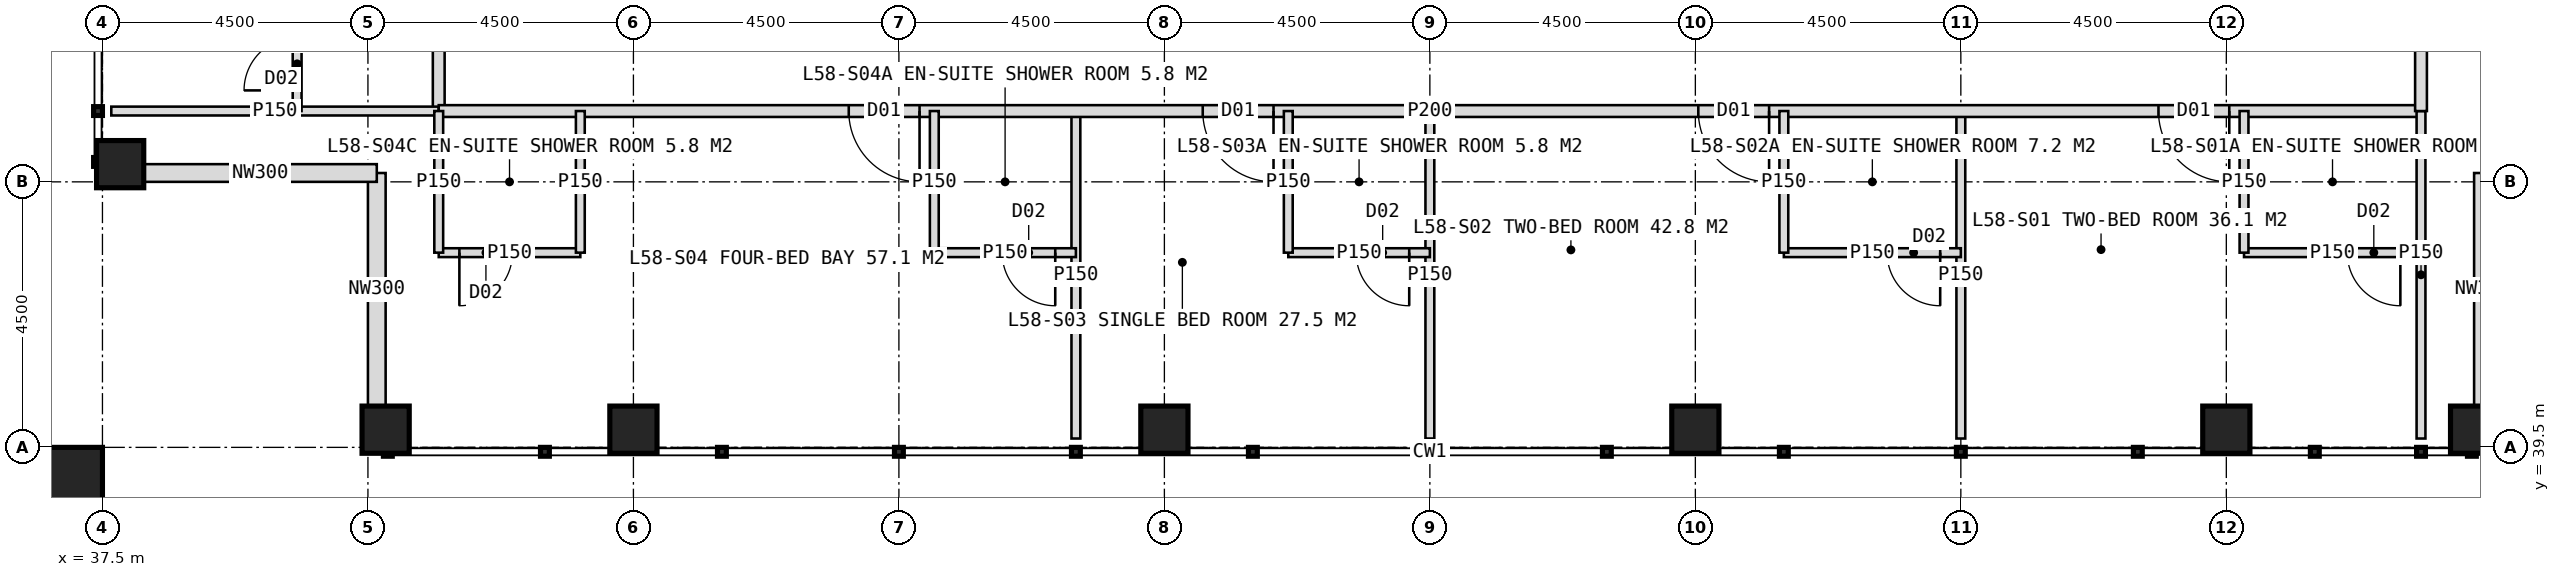
"""IFC4 building model, lengths in metres.
Left out: names, types, materials, properties, quantities, classifications, styles, units other than length and angle.
Written with IfcOpenShell. Run it as: python <this file> out.ifc"""

import sys

from ifc_helpers import new_model, si_unit, direction, frame, frame_2d, origin, origin_2d, place, context, subcontext, project, spatial, rectangle, hollow_rectangle, extrude, element, fill, save


model = new_model("IFC4")
c1 = context("Model", 3, precision=1e-05, world=origin(), true_north=direction((0.0, 1.0)))
c2 = subcontext(c1, "Body", "Model", "MODEL_VIEW")
j1 = project(units=[si_unit("LENGTHUNIT", "METRE"), si_unit("PLANEANGLEUNIT", "RADIAN")], contexts=[c1])
p1 = place(None, origin())
s1 = spatial("IfcSite", under=j1, at=p1, CompositionType="ELEMENT")
p2 = place(p1, origin())
s2 = spatial("IfcBuilding", under=s1, at=p2, CompositionType="ELEMENT")
p3 = place(p2, frame((0.0, 0.0, 241.0)))
s3 = spatial("IfcBuildingStorey", under=s2, at=p3, CompositionType="ELEMENT", Elevation=241.0)
for number, where, z_axis, x_axis in (
    (1, (42.3, 39.8, 0.0), (0.0, 0.0, 1.0), (1.0, 0.0, 0.0)),
    (2, (37.8, 44.3, 0.0), (0.0, 0.0, 1.0), (1.0, 0.0, 0.0)),
    (3, (46.5, 39.8, 0.0), (0.0, 0.0, 1.0), (1.0, 0.0, 0.0)),
    (4, (55.5, 39.8, 0.0), (0.0, 0.0, 1.0), (1.0, 0.0, 0.0)),
    (5, (64.5, 39.8, 0.0), (0.0, 0.0, 1.0), (1.0, 0.0, 0.0)),
    (6, (73.5, 39.8, 0.0), (0.0, 0.0, 1.0), (1.0, 0.0, 0.0)),
    (7, (77.7, 39.8, 0.0), (0.0, 0.0, 1.0), (1.0, 0.0, 0.0)),
):
    element("IfcColumn", number, at=place(p3, frame(where, z_axis=z_axis, x_axis=x_axis)), inside=s3, PredefinedType="COLUMN", context=c2, shape_type="SweptSolid", body=[
        extrude(hollow_rectangle(XDim=0.8, YDim=0.8, WallThickness=0.08, at=origin_2d()), origin(), (0.0, 0.0, 1.0), 4.0),
    ])
p4 = place(p3, frame((36.9, 38.9, 0.0), z_axis=(0.0, 0.0, 1.0), x_axis=(1.0, 0.0, 0.0)))
e8 = element("IfcColumn", 8, at=p4, inside=s3, PredefinedType="COLUMN", context=c2, shape_type="SweptSolid", body=[
    extrude(hollow_rectangle(XDim=1.2, YDim=1.2, WallThickness=0.07, at=origin_2d()), origin(), (0.0, 0.0, 1.0), 2.0),
])
for number, where, z_axis, x_axis in (
    (9, (42.15, 40.2, 0.0), (0.0, 0.0, 1.0), (0.0, 1.0, 0.0)),
    (10, (42.15, 44.15, 0.0), (0.0, 0.0, 1.0), (-1.0, 0.0, 0.0)),
    (11, (77.85, 44.15, 0.0), (0.0, 0.0, 1.0), (0.0, -1.0, 0.0)),
):
    element("IfcWall", number, at=place(p3, frame(where, z_axis=z_axis, x_axis=x_axis)), inside=s3, PredefinedType="ELEMENTEDWALL", context=c2, shape_type="SweptSolid", body=[
        extrude(rectangle(XDim=3.95, YDim=0.3, at=frame_2d((1.975, 0.0))), origin(), (0.0, 0.0, 1.0), 2.95),
    ])
p5 = place(p3, frame((43.2, 45.2, 0.0), z_axis=(0.0, 0.0, 1.0), x_axis=(0.0, 1.0, 0.0)))
e12 = element("IfcWall", 12, at=p5, inside=s3, PredefinedType="PARTITIONING", context=c2, shape_type="SweptSolid", body=[
    extrude(rectangle(XDim=33.6, YDim=0.2, at=frame_2d((16.8, 0.0))), origin(), (0.0, 0.0, 1.0), 3.75),
])
p6 = place(p5, frame((2.65, 0.0, 0.0)))
e13 = element("IfcOpeningElement", 13, at=p6, cuts=e12, PredefinedType="OPENING", context=c2, shape_type="SweptSolid", body=[
    extrude(rectangle(XDim=1.2, YDim=2.2, at=frame_2d((0.6, 1.1))), frame((0.0, 0.11, 0.0), z_axis=(0.0, -1.0, 0.0), x_axis=(1.0, 0.0, 0.0)), (0.0, 0.0, 1.0), 0.22),
])
p7 = place(p5, frame((7.45, 0.0, 0.0)))
e14 = element("IfcOpeningElement", 14, at=p7, cuts=e12, PredefinedType="OPENING", context=c2, shape_type="SweptSolid", body=[
    extrude(rectangle(XDim=1.2, YDim=2.2, at=frame_2d((0.6, 1.1))), frame((0.0, 0.11, 0.0), z_axis=(0.0, -1.0, 0.0), x_axis=(1.0, 0.0, 0.0)), (0.0, 0.0, 1.0), 0.22),
])
p8 = place(p5, frame((13.45, 0.0, 0.0)))
e15 = element("IfcOpeningElement", 15, at=p8, cuts=e12, PredefinedType="OPENING", context=c2, shape_type="SweptSolid", body=[
    extrude(rectangle(XDim=1.2, YDim=2.2, at=frame_2d((0.6, 1.1))), frame((0.0, 0.11, 0.0), z_axis=(0.0, -1.0, 0.0), x_axis=(1.0, 0.0, 0.0)), (0.0, 0.0, 1.0), 0.22),
])
p9 = place(p5, frame((20.05, 0.0, 0.0)))
e16 = element("IfcOpeningElement", 16, at=p9, cuts=e12, PredefinedType="OPENING", context=c2, shape_type="SweptSolid", body=[
    extrude(rectangle(XDim=1.2, YDim=2.2, at=frame_2d((0.6, 1.1))), frame((0.0, 0.11, 0.0), z_axis=(0.0, -1.0, 0.0), x_axis=(1.0, 0.0, 0.0)), (0.0, 0.0, 1.0), 0.22),
])
p10 = place(p5, frame((29.05, 0.0, 0.0)))
e17 = element("IfcOpeningElement", 17, at=p10, cuts=e12, PredefinedType="OPENING", context=c2, shape_type="SweptSolid", body=[
    extrude(rectangle(XDim=1.2, YDim=2.2, at=frame_2d((0.6, 1.1))), frame((0.0, 0.11, 0.0), z_axis=(0.0, -1.0, 0.0), x_axis=(1.0, 0.0, 0.0)), (0.0, 0.0, 1.0), 0.22),
])
p11 = place(p3, frame((43.2, 45.2, 0.0), z_axis=(0.0, 0.0, 1.0), x_axis=(-1.0, 0.0, 0.0)))
e18 = element("IfcWall", 18, at=p11, inside=s3, PredefinedType="PARTITIONING", context=c2, shape_type="SweptSolid", body=[
    extrude(rectangle(XDim=5.55, YDim=0.15, at=frame_2d((2.775, 0.0))), origin(), (0.0, 0.0, 1.0), 3.75),
])
p12 = place(p3, frame((40.8, 45.2, 0.0), z_axis=(0.0, 0.0, 1.0), x_axis=(0.0, 1.0, 0.0)))
e19 = element("IfcWall", 19, at=p12, inside=s3, PredefinedType="PARTITIONING", context=c2, shape_type="SweptSolid", body=[
    extrude(rectangle(XDim=2.4, YDim=0.15, at=frame_2d((1.2, 0.0))), origin(), (0.0, 0.0, 1.0), 3.75),
])
p13 = place(p12, frame((0.35, 0.0, 0.0)))
e20 = element("IfcOpeningElement", 20, at=p13, cuts=e19, PredefinedType="OPENING", context=c2, shape_type="SweptSolid", body=[
    extrude(rectangle(XDim=0.9, YDim=2.1, at=frame_2d((0.45, 1.05))), frame((0.0, 0.085, 0.0), z_axis=(0.0, -1.0, 0.0), x_axis=(1.0, 0.0, 0.0)), (0.0, 0.0, 1.0), 0.17),
])
p14 = place(p3, frame((69.0, 45.2, 0.0), z_axis=(0.0, 0.0, 1.0), x_axis=(0.0, -1.0, 0.0)))
e21 = element("IfcWall", 21, at=p14, inside=s3, PredefinedType="PARTITIONING", context=c2, shape_type="SweptSolid", body=[
    extrude(rectangle(XDim=5.55, YDim=0.15, at=frame_2d((2.775, 0.0))), origin(), (0.0, 0.0, 1.0), 3.75),
])
p15 = place(p3, frame((60.0, 45.2, 0.0), z_axis=(0.0, 0.0, 1.0), x_axis=(0.0, -1.0, 0.0)))
e22 = element("IfcWall", 22, at=p15, inside=s3, PredefinedType="PARTITIONING", context=c2, shape_type="SweptSolid", body=[
    extrude(rectangle(XDim=5.55, YDim=0.15, at=frame_2d((2.775, 0.0))), origin(), (0.0, 0.0, 1.0), 2.95),
])
p16 = place(p3, frame((54.0, 45.2, 0.0), z_axis=(0.0, 0.0, 1.0), x_axis=(0.0, -1.0, 0.0)))
e23 = element("IfcWall", 23, at=p16, inside=s3, PredefinedType="PARTITIONING", context=c2, shape_type="SweptSolid", body=[
    extrude(rectangle(XDim=5.55, YDim=0.15, at=frame_2d((2.775, 0.0))), origin(), (0.0, 0.0, 1.0), 3.75),
])
p17 = place(p3, frame((76.8, 45.2, 0.0), z_axis=(0.0, 0.0, 1.0), x_axis=(-1.0, 0.0, 0.0)))
e24 = element("IfcWall", 24, at=p17, inside=s3, PredefinedType="PARTITIONING", context=c2, shape_type="SweptSolid", body=[
    extrude(rectangle(XDim=33.6, YDim=0.2, at=frame_2d((16.8, 0.0))), origin(), (0.0, 0.0, 1.0), 3.75),
])
p18 = place(p17, frame((3.25, 0.0, 0.0)))
e25 = element("IfcOpeningElement", 25, at=p18, cuts=e24, PredefinedType="OPENING", context=c2, shape_type="SweptSolid", body=[
    extrude(rectangle(XDim=1.2, YDim=2.2, at=frame_2d((0.6, 1.1))), frame((0.0, 0.11, 0.0), z_axis=(0.0, -1.0, 0.0), x_axis=(1.0, 0.0, 0.0)), (0.0, 0.0, 1.0), 0.22),
])
p19 = place(p17, frame((11.05, 0.0, 0.0)))
e26 = element("IfcOpeningElement", 26, at=p19, cuts=e24, PredefinedType="OPENING", context=c2, shape_type="SweptSolid", body=[
    extrude(rectangle(XDim=1.2, YDim=2.2, at=frame_2d((0.6, 1.1))), frame((0.0, 0.11, 0.0), z_axis=(0.0, -1.0, 0.0), x_axis=(1.0, 0.0, 0.0)), (0.0, 0.0, 1.0), 0.22),
])
p20 = place(p17, frame((19.45, 0.0, 0.0)))
e27 = element("IfcOpeningElement", 27, at=p20, cuts=e24, PredefinedType="OPENING", context=c2, shape_type="SweptSolid", body=[
    extrude(rectangle(XDim=1.2, YDim=2.2, at=frame_2d((0.6, 1.1))), frame((0.0, 0.11, 0.0), z_axis=(0.0, -1.0, 0.0), x_axis=(1.0, 0.0, 0.0)), (0.0, 0.0, 1.0), 0.22),
])
p21 = place(p17, frame((25.45, 0.0, 0.0)))
e28 = element("IfcOpeningElement", 28, at=p21, cuts=e24, PredefinedType="OPENING", context=c2, shape_type="SweptSolid", body=[
    extrude(rectangle(XDim=1.2, YDim=2.2, at=frame_2d((0.6, 1.1))), frame((0.0, 0.11, 0.0), z_axis=(0.0, -1.0, 0.0), x_axis=(1.0, 0.0, 0.0)), (0.0, 0.0, 1.0), 0.22),
])
p22 = place(p3, frame((76.8, 45.2, 0.0), z_axis=(0.0, 0.0, 1.0), x_axis=(0.0, -1.0, 0.0)))
e29 = element("IfcWall", 29, at=p22, inside=s3, PredefinedType="PARTITIONING", context=c2, shape_type="SweptSolid", body=[
    extrude(rectangle(XDim=5.55, YDim=0.15, at=frame_2d((2.775, 0.0))), origin(), (0.0, 0.0, 1.0), 3.75),
])
p23 = place(p3, frame((76.8, 42.8, 0.0), z_axis=(0.0, 0.0, 1.0), x_axis=(-1.0, 0.0, 0.0)))
e30 = element("IfcWall", 30, at=p23, inside=s3, PredefinedType="PARTITIONING", context=c2, shape_type="SweptSolid", body=[
    extrude(rectangle(XDim=3.0, YDim=0.15, at=frame_2d((1.5, 0.0))), origin(), (0.0, 0.0, 1.0), 3.75),
])
p24 = place(p23, frame((0.35, 0.0, 0.0)))
e31 = element("IfcOpeningElement", 31, at=p24, cuts=e30, PredefinedType="OPENING", context=c2, shape_type="SweptSolid", body=[
    extrude(rectangle(XDim=0.9, YDim=2.1, at=frame_2d((0.45, 1.05))), frame((0.0, 0.085, 0.0), z_axis=(0.0, -1.0, 0.0), x_axis=(1.0, 0.0, 0.0)), (0.0, 0.0, 1.0), 0.17),
])
p25 = place(p3, frame((73.8, 45.2, 0.0), z_axis=(0.0, 0.0, 1.0), x_axis=(0.0, -1.0, 0.0)))
e32 = element("IfcWall", 32, at=p25, inside=s3, PredefinedType="PARTITIONING", context=c2, shape_type="SweptSolid", body=[
    extrude(rectangle(XDim=2.4, YDim=0.15, at=frame_2d((1.2, 0.0))), origin(), (0.0, 0.0, 1.0), 3.75),
])
p26 = place(p3, frame((69.0, 42.8, 0.0), z_axis=(0.0, 0.0, 1.0), x_axis=(-1.0, 0.0, 0.0)))
e33 = element("IfcWall", 33, at=p26, inside=s3, PredefinedType="PARTITIONING", context=c2, shape_type="SweptSolid", body=[
    extrude(rectangle(XDim=3.0, YDim=0.15, at=frame_2d((1.5, 0.0))), origin(), (0.0, 0.0, 1.0), 3.75),
])
p27 = place(p26, frame((0.35, 0.0, 0.0)))
e34 = element("IfcOpeningElement", 34, at=p27, cuts=e33, PredefinedType="OPENING", context=c2, shape_type="SweptSolid", body=[
    extrude(rectangle(XDim=0.9, YDim=2.1, at=frame_2d((0.45, 1.05))), frame((0.0, 0.085, 0.0), z_axis=(0.0, -1.0, 0.0), x_axis=(1.0, 0.0, 0.0)), (0.0, 0.0, 1.0), 0.17),
])
p28 = place(p3, frame((66.0, 45.2, 0.0), z_axis=(0.0, 0.0, 1.0), x_axis=(0.0, -1.0, 0.0)))
e35 = element("IfcWall", 35, at=p28, inside=s3, PredefinedType="PARTITIONING", context=c2, shape_type="SweptSolid", body=[
    extrude(rectangle(XDim=2.4, YDim=0.15, at=frame_2d((1.2, 0.0))), origin(), (0.0, 0.0, 1.0), 3.75),
])
p29 = place(p3, frame((60.0, 42.8, 0.0), z_axis=(0.0, 0.0, 1.0), x_axis=(-1.0, 0.0, 0.0)))
e36 = element("IfcWall", 36, at=p29, inside=s3, PredefinedType="PARTITIONING", context=c2, shape_type="SweptSolid", body=[
    extrude(rectangle(XDim=2.4, YDim=0.15, at=frame_2d((1.2, 0.0))), origin(), (0.0, 0.0, 1.0), 3.75),
])
p30 = place(p29, frame((0.35, 0.0, 0.0)))
e37 = element("IfcOpeningElement", 37, at=p30, cuts=e36, PredefinedType="OPENING", context=c2, shape_type="SweptSolid", body=[
    extrude(rectangle(XDim=0.9, YDim=2.1, at=frame_2d((0.45, 1.05))), frame((0.0, 0.085, 0.0), z_axis=(0.0, -1.0, 0.0), x_axis=(1.0, 0.0, 0.0)), (0.0, 0.0, 1.0), 0.17),
])
p31 = place(p3, frame((57.6, 45.2, 0.0), z_axis=(0.0, 0.0, 1.0), x_axis=(0.0, -1.0, 0.0)))
e38 = element("IfcWall", 38, at=p31, inside=s3, PredefinedType="PARTITIONING", context=c2, shape_type="SweptSolid", body=[
    extrude(rectangle(XDim=2.4, YDim=0.15, at=frame_2d((1.2, 0.0))), origin(), (0.0, 0.0, 1.0), 3.75),
])
p32 = place(p3, frame((54.0, 42.8, 0.0), z_axis=(0.0, 0.0, 1.0), x_axis=(-1.0, 0.0, 0.0)))
e39 = element("IfcWall", 39, at=p32, inside=s3, PredefinedType="PARTITIONING", context=c2, shape_type="SweptSolid", body=[
    extrude(rectangle(XDim=2.4, YDim=0.15, at=frame_2d((1.2, 0.0))), origin(), (0.0, 0.0, 1.0), 3.75),
])
p33 = place(p32, frame((0.35, 0.0, 0.0)))
e40 = element("IfcOpeningElement", 40, at=p33, cuts=e39, PredefinedType="OPENING", context=c2, shape_type="SweptSolid", body=[
    extrude(rectangle(XDim=0.9, YDim=2.1, at=frame_2d((0.45, 1.05))), frame((0.0, 0.085, 0.0), z_axis=(0.0, -1.0, 0.0), x_axis=(1.0, 0.0, 0.0)), (0.0, 0.0, 1.0), 0.17),
])
p34 = place(p3, frame((51.6, 45.2, 0.0), z_axis=(0.0, 0.0, 1.0), x_axis=(0.0, -1.0, 0.0)))
e41 = element("IfcWall", 41, at=p34, inside=s3, PredefinedType="PARTITIONING", context=c2, shape_type="SweptSolid", body=[
    extrude(rectangle(XDim=2.4, YDim=0.15, at=frame_2d((1.2, 0.0))), origin(), (0.0, 0.0, 1.0), 3.75),
])
p35 = place(p3, frame((45.6, 42.8, 0.0), z_axis=(0.0, 0.0, 1.0), x_axis=(-1.0, 0.0, 0.0)))
e42 = element("IfcWall", 42, at=p35, inside=s3, PredefinedType="PARTITIONING", context=c2, shape_type="SweptSolid", body=[
    extrude(rectangle(XDim=2.4, YDim=0.15, at=frame_2d((1.2, 0.0))), origin(), (0.0, 0.0, 1.0), 3.75),
])
p36 = place(p35, frame((1.15, 0.0, 0.0)))
e43 = element("IfcOpeningElement", 43, at=p36, cuts=e42, PredefinedType="OPENING", context=c2, shape_type="SweptSolid", body=[
    extrude(rectangle(XDim=0.9, YDim=2.1, at=frame_2d((0.45, 1.05))), frame((0.0, 0.085, 0.0), z_axis=(0.0, -1.0, 0.0), x_axis=(1.0, 0.0, 0.0)), (0.0, 0.0, 1.0), 0.17),
])
for number, where, z_axis, x_axis in (
    (44, (45.6, 45.2, 0.0), (0.0, 0.0, 1.0), (0.0, -1.0, 0.0)),
    (45, (43.2, 45.2, 0.0), (0.0, 0.0, 1.0), (0.0, -1.0, 0.0)),
):
    element("IfcWall", number, at=place(p3, frame(where, z_axis=z_axis, x_axis=x_axis)), inside=s3, PredefinedType="PARTITIONING", context=c2, shape_type="SweptSolid", body=[
        extrude(rectangle(XDim=2.4, YDim=0.15, at=frame_2d((1.2, 0.0))), origin(), (0.0, 0.0, 1.0), 3.75),
    ])
p37 = place(p3, frame((76.8, 78.8, 0.0), z_axis=(0.0, 0.0, 1.0), x_axis=(0.0, -1.0, 0.0)))
e46 = element("IfcWall", 46, at=p37, inside=s3, PredefinedType="PARTITIONING", context=c2, shape_type="SweptSolid", body=[
    extrude(rectangle(XDim=33.6, YDim=0.2, at=frame_2d((16.8, 0.0))), origin(), (0.0, 0.0, 1.0), 3.75),
])
p38 = place(p37, frame((2.65, 0.0, 0.0)))
e47 = element("IfcOpeningElement", 47, at=p38, cuts=e46, PredefinedType="OPENING", context=c2, shape_type="SweptSolid", body=[
    extrude(rectangle(XDim=1.2, YDim=2.2, at=frame_2d((0.6, 1.1))), frame((0.0, 0.11, 0.0), z_axis=(0.0, -1.0, 0.0), x_axis=(1.0, 0.0, 0.0)), (0.0, 0.0, 1.0), 0.22),
])
p39 = place(p37, frame((7.45, 0.0, 0.0)))
e48 = element("IfcOpeningElement", 48, at=p39, cuts=e46, PredefinedType="OPENING", context=c2, shape_type="SweptSolid", body=[
    extrude(rectangle(XDim=1.2, YDim=2.2, at=frame_2d((0.6, 1.1))), frame((0.0, 0.11, 0.0), z_axis=(0.0, -1.0, 0.0), x_axis=(1.0, 0.0, 0.0)), (0.0, 0.0, 1.0), 0.22),
])
p40 = place(p37, frame((13.45, 0.0, 0.0)))
e49 = element("IfcOpeningElement", 49, at=p40, cuts=e46, PredefinedType="OPENING", context=c2, shape_type="SweptSolid", body=[
    extrude(rectangle(XDim=1.2, YDim=2.2, at=frame_2d((0.6, 1.1))), frame((0.0, 0.11, 0.0), z_axis=(0.0, -1.0, 0.0), x_axis=(1.0, 0.0, 0.0)), (0.0, 0.0, 1.0), 0.22),
])
p41 = place(p37, frame((20.05, 0.0, 0.0)))
e50 = element("IfcOpeningElement", 50, at=p41, cuts=e46, PredefinedType="OPENING", context=c2, shape_type="SweptSolid", body=[
    extrude(rectangle(XDim=1.2, YDim=2.2, at=frame_2d((0.6, 1.1))), frame((0.0, 0.11, 0.0), z_axis=(0.0, -1.0, 0.0), x_axis=(1.0, 0.0, 0.0)), (0.0, 0.0, 1.0), 0.22),
])
p42 = place(p37, frame((29.05, 0.0, 0.0)))
e51 = element("IfcOpeningElement", 51, at=p42, cuts=e46, PredefinedType="OPENING", context=c2, shape_type="SweptSolid", body=[
    extrude(rectangle(XDim=1.2, YDim=2.2, at=frame_2d((0.6, 1.1))), frame((0.0, 0.11, 0.0), z_axis=(0.0, -1.0, 0.0), x_axis=(1.0, 0.0, 0.0)), (0.0, 0.0, 1.0), 0.22),
])
p43 = place(p13, origin())
e52 = element("IfcDoor", 52, at=p43, inside=s3, OperationType="SINGLE_SWING_LEFT", PredefinedType="DOOR", context=c2, shape_type="SweptSolid", body=[
    extrude(rectangle(XDim=0.9, YDim=2.1, at=frame_2d((0.45, 1.05))), frame((0.0, 0.025, 0.0), z_axis=(0.0, -1.0, 0.0), x_axis=(1.0, 0.0, 0.0)), (0.0, 0.0, 1.0), 0.05),
])
fill(e20, e52)
p44 = place(p18, origin())
e53 = element("IfcDoor", 53, at=p44, inside=s3, OperationType="SINGLE_SWING_LEFT", PredefinedType="DOOR", context=c2, shape_type="SweptSolid", body=[
    extrude(rectangle(XDim=1.2, YDim=2.2, at=frame_2d((0.6, 1.1))), frame((0.0, 0.025, 0.0), z_axis=(0.0, -1.0, 0.0), x_axis=(1.0, 0.0, 0.0)), (0.0, 0.0, 1.0), 0.05),
])
fill(e25, e53)
p45 = place(p24, origin())
e54 = element("IfcDoor", 54, at=p45, inside=s3, OperationType="SINGLE_SWING_LEFT", PredefinedType="DOOR", context=c2, shape_type="SweptSolid", body=[
    extrude(rectangle(XDim=0.9, YDim=2.1, at=frame_2d((0.45, 1.05))), frame((0.0, 0.025, 0.0), z_axis=(0.0, -1.0, 0.0), x_axis=(1.0, 0.0, 0.0)), (0.0, 0.0, 1.0), 0.05),
])
fill(e31, e54)
p46 = place(p19, origin())
e55 = element("IfcDoor", 55, at=p46, inside=s3, OperationType="SINGLE_SWING_LEFT", PredefinedType="DOOR", context=c2, shape_type="SweptSolid", body=[
    extrude(rectangle(XDim=1.2, YDim=2.2, at=frame_2d((0.6, 1.1))), frame((0.0, 0.025, 0.0), z_axis=(0.0, -1.0, 0.0), x_axis=(1.0, 0.0, 0.0)), (0.0, 0.0, 1.0), 0.05),
])
fill(e26, e55)
p47 = place(p27, origin())
e56 = element("IfcDoor", 56, at=p47, inside=s3, OperationType="SINGLE_SWING_LEFT", PredefinedType="DOOR", context=c2, shape_type="SweptSolid", body=[
    extrude(rectangle(XDim=0.9, YDim=2.1, at=frame_2d((0.45, 1.05))), frame((0.0, 0.025, 0.0), z_axis=(0.0, -1.0, 0.0), x_axis=(1.0, 0.0, 0.0)), (0.0, 0.0, 1.0), 0.05),
])
fill(e34, e56)
p48 = place(p20, origin())
e57 = element("IfcDoor", 57, at=p48, inside=s3, OperationType="SINGLE_SWING_LEFT", PredefinedType="DOOR", context=c2, shape_type="SweptSolid", body=[
    extrude(rectangle(XDim=1.2, YDim=2.2, at=frame_2d((0.6, 1.1))), frame((0.0, 0.025, 0.0), z_axis=(0.0, -1.0, 0.0), x_axis=(1.0, 0.0, 0.0)), (0.0, 0.0, 1.0), 0.05),
])
fill(e27, e57)
p49 = place(p30, origin())
e58 = element("IfcDoor", 58, at=p49, inside=s3, OperationType="SINGLE_SWING_LEFT", PredefinedType="DOOR", context=c2, shape_type="SweptSolid", body=[
    extrude(rectangle(XDim=0.9, YDim=2.1, at=frame_2d((0.45, 1.05))), frame((0.0, 0.025, 0.0), z_axis=(0.0, -1.0, 0.0), x_axis=(1.0, 0.0, 0.0)), (0.0, 0.0, 1.0), 0.05),
])
fill(e37, e58)
p50 = place(p21, origin())
e59 = element("IfcDoor", 59, at=p50, inside=s3, OperationType="SINGLE_SWING_LEFT", PredefinedType="DOOR", context=c2, shape_type="SweptSolid", body=[
    extrude(rectangle(XDim=1.2, YDim=2.2, at=frame_2d((0.6, 1.1))), frame((0.0, 0.025, 0.0), z_axis=(0.0, -1.0, 0.0), x_axis=(1.0, 0.0, 0.0)), (0.0, 0.0, 1.0), 0.05),
])
fill(e28, e59)
p51 = place(p33, origin())
e60 = element("IfcDoor", 60, at=p51, inside=s3, OperationType="SINGLE_SWING_LEFT", PredefinedType="DOOR", context=c2, shape_type="SweptSolid", body=[
    extrude(rectangle(XDim=0.9, YDim=2.1, at=frame_2d((0.45, 1.05))), frame((0.0, 0.025, 0.0), z_axis=(0.0, -1.0, 0.0), x_axis=(1.0, 0.0, 0.0)), (0.0, 0.0, 1.0), 0.05),
])
fill(e40, e60)
p52 = place(p36, origin())
e61 = element("IfcDoor", 61, at=p52, inside=s3, OperationType="SINGLE_SWING_RIGHT", PredefinedType="DOOR", context=c2, shape_type="SweptSolid", body=[
    extrude(rectangle(XDim=0.9, YDim=2.1, at=frame_2d((0.45, 1.05))), frame((0.0, 0.025, 0.0), z_axis=(0.0, -1.0, 0.0), x_axis=(1.0, 0.0, 0.0)), (0.0, 0.0, 1.0), 0.05),
])
fill(e43, e61)
save(model, sys.argv[1])
